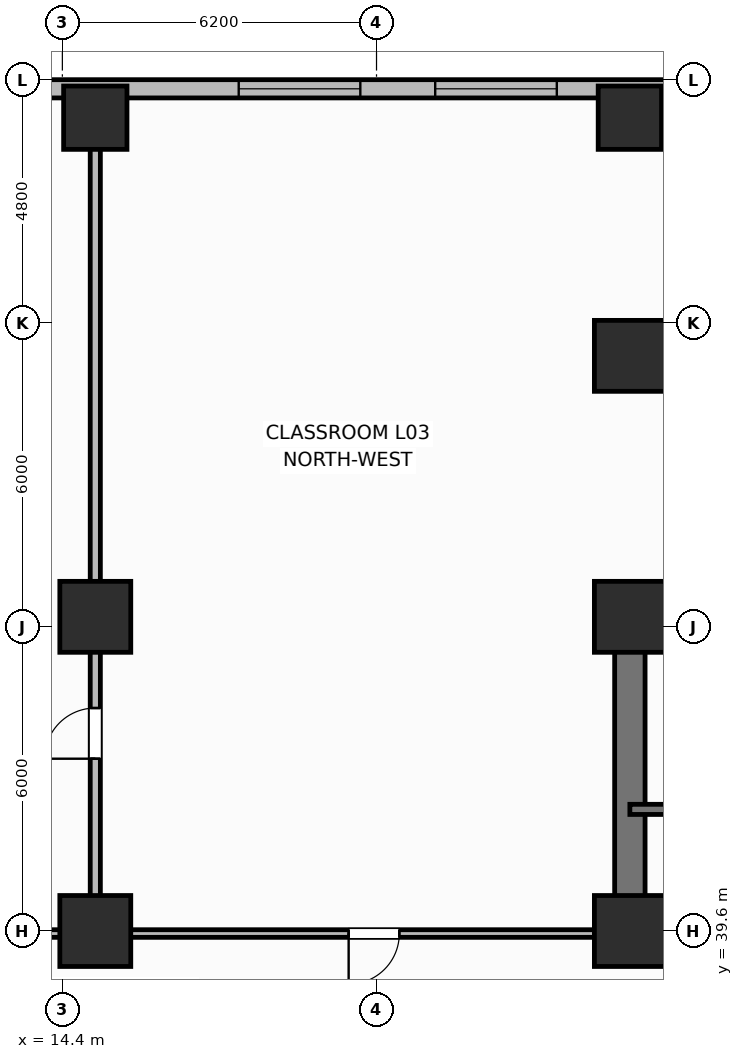
"""IFC4 building model, lengths in metres.
Left out: names, types, materials, properties, quantities, classifications, styles, units other than length and angle.
Written with IfcOpenShell. Run it as: python <this file> out.ifc"""

import sys

from ifc_helpers import new_model, si_unit, direction, frame, frame_2d, origin, origin_2d, place, context, subcontext, project, spatial, rectangle, extrude, element, fill, save


model = new_model("IFC4")
c1 = context("Model", 3, precision=1e-05, world=origin(), true_north=direction((0.0, 1.0)))
c2 = subcontext(c1, "Body", "Model", "MODEL_VIEW")
j1 = project(units=[si_unit("LENGTHUNIT", "METRE"), si_unit("PLANEANGLEUNIT", "RADIAN")], contexts=[c1])
p1 = place(None, origin())
s1 = spatial("IfcSite", under=j1, at=p1, CompositionType="ELEMENT")
p2 = place(p1, origin())
s2 = spatial("IfcBuilding", under=s1, at=p2, CompositionType="ELEMENT")
p3 = place(p2, frame((0.0, 0.0, 15.6)))
s3 = spatial("IfcBuildingStorey", under=s2, at=p3, CompositionType="ELEMENT", Elevation=15.6)
p4 = place(p3, frame((25.6, 45.8, 0.0), z_axis=(0.0, 0.0, 1.0), x_axis=(1.0, 0.0, 0.0)))
e1 = element("IfcWall", 1, at=p4, inside=s3, PredefinedType="SHEAR", context=c2, shape_type="SweptSolid", body=[
    extrude(rectangle(XDim=27.2, YDim=0.6, at=frame_2d((13.6, 0.0))), origin(), (0.0, 0.0, 1.0), 4.5),
])
p5 = place(p3, frame((25.6, 39.9, 0.0), z_axis=(0.0, 0.0, 1.0), x_axis=(0.0, 1.0, 0.0)))
e2 = element("IfcWall", 2, at=p5, inside=s3, PredefinedType="SHEAR", context=c2, shape_type="SweptSolid", body=[
    extrude(rectangle(XDim=5.6, YDim=0.6, at=frame_2d((2.8, 0.0))), origin(), (0.0, 0.0, 1.0), 4.5),
])
p6 = place(p3, frame((52.8, 39.6, 0.0), z_axis=(0.0, 0.0, 1.0), x_axis=(-1.0, 0.0, 0.0)))
e3 = element("IfcWall", 3, at=p6, inside=s3, PredefinedType="SHEAR", context=c2, shape_type="SweptSolid", body=[
    extrude(rectangle(XDim=27.2, YDim=0.6, at=frame_2d((13.6, 0.0))), origin(), (0.0, 0.0, 1.0), 4.5),
])
p7 = place(p6, frame((24.3, 0.0, 0.0)))
e4 = element("IfcOpeningElement", 4, at=p7, cuts=e3, PredefinedType="OPENING", context=c2, shape_type="SweptSolid", body=[
    extrude(rectangle(XDim=1.1, YDim=2.15, at=frame_2d((0.55, 1.075))), frame((0.0, 0.31, 0.0), z_axis=(0.0, -1.0, 0.0), x_axis=(1.0, 0.0, 0.0)), (0.0, 0.0, 1.0), 0.62),
])
p8 = place(p6, frame((21.85, 0.0, 0.0)))
e5 = element("IfcOpeningElement", 5, at=p8, cuts=e3, PredefinedType="OPENING", context=c2, shape_type="SweptSolid", body=[
    extrude(rectangle(XDim=0.85, YDim=2.1, at=frame_2d((0.425, 1.05))), frame((0.0, 0.31, 0.0), z_axis=(0.0, -1.0, 0.0), x_axis=(1.0, 0.0, 0.0)), (0.0, 0.0, 1.0), 0.62),
])
p9 = place(p6, frame((19.85, 0.0, 0.0)))
e6 = element("IfcOpeningElement", 6, at=p9, cuts=e3, PredefinedType="OPENING", context=c2, shape_type="SweptSolid", body=[
    extrude(rectangle(XDim=0.85, YDim=2.1, at=frame_2d((0.425, 1.05))), frame((0.0, 0.31, 0.0), z_axis=(0.0, -1.0, 0.0), x_axis=(1.0, 0.0, 0.0)), (0.0, 0.0, 1.0), 0.62),
])
p10 = place(p6, frame((15.1, 0.0, 0.0)))
e7 = element("IfcOpeningElement", 7, at=p10, cuts=e3, PredefinedType="OPENING", context=c2, shape_type="SweptSolid", body=[
    extrude(rectangle(XDim=1.2, YDim=2.15, at=frame_2d((0.6, 1.075))), frame((0.0, 0.31, 0.0), z_axis=(0.0, -1.0, 0.0), x_axis=(1.0, 0.0, 0.0)), (0.0, 0.0, 1.0), 0.62),
])
p11 = place(p6, frame((12.6, 0.0, 0.0)))
e8 = element("IfcOpeningElement", 8, at=p11, cuts=e3, PredefinedType="OPENING", context=c2, shape_type="SweptSolid", body=[
    extrude(rectangle(XDim=0.85, YDim=2.1, at=frame_2d((0.425, 1.05))), frame((0.0, 0.31, 0.0), z_axis=(0.0, -1.0, 0.0), x_axis=(1.0, 0.0, 0.0)), (0.0, 0.0, 1.0), 0.62),
])
p12 = place(p6, frame((10.85, 0.0, 0.0)))
e9 = element("IfcOpeningElement", 9, at=p12, cuts=e3, PredefinedType="OPENING", context=c2, shape_type="SweptSolid", body=[
    extrude(rectangle(XDim=0.85, YDim=2.1, at=frame_2d((0.425, 1.05))), frame((0.0, 0.31, 0.0), z_axis=(0.0, -1.0, 0.0), x_axis=(1.0, 0.0, 0.0)), (0.0, 0.0, 1.0), 0.62),
])
p13 = place(p6, frame((6.85, 0.0, 0.0)))
e10 = element("IfcOpeningElement", 10, at=p13, cuts=e3, PredefinedType="OPENING", context=c2, shape_type="SweptSolid", body=[
    extrude(rectangle(XDim=0.85, YDim=2.1, at=frame_2d((0.425, 1.05))), frame((0.0, 0.31, 0.0), z_axis=(0.0, -1.0, 0.0), x_axis=(1.0, 0.0, 0.0)), (0.0, 0.0, 1.0), 0.62),
])
p14 = place(p6, frame((2.0, 0.0, 0.0)))
e11 = element("IfcOpeningElement", 11, at=p14, cuts=e3, PredefinedType="OPENING", context=c2, shape_type="SweptSolid", body=[
    extrude(rectangle(XDim=0.85, YDim=2.1, at=frame_2d((0.425, 1.05))), frame((0.0, 0.31, 0.0), z_axis=(0.0, -1.0, 0.0), x_axis=(1.0, 0.0, 0.0)), (0.0, 0.0, 1.0), 0.62),
])
for number, where, z_axis, x_axis in (
    (12, (25.6, 39.6, 0.0), (0.0, 0.0, 1.0), (1.0, 0.0, 0.0)),
    (13, (25.6, 45.8, 0.0), (0.0, 0.0, 1.0), (1.0, 0.0, 0.0)),
):
    element("IfcColumn", number, at=place(p3, frame(where, z_axis=z_axis, x_axis=x_axis)), inside=s3, PredefinedType="COLUMN", context=c2, shape_type="SweptSolid", body=[
        extrude(rectangle(XDim=1.4, YDim=1.4, at=origin_2d()), origin(), (0.0, 0.0, 1.0), 4.5),
    ])
for number, where, z_axis, x_axis in (
    (14, (15.05, 55.65, 0.0), (0.0, 0.0, 1.0), (1.0, 0.0, 0.0)),
    (15, (25.6, 55.65, 0.0), (0.0, 0.0, 1.0), (1.0, 0.0, 0.0)),
):
    element("IfcColumn", number, at=place(p3, frame(where, z_axis=z_axis, x_axis=x_axis)), inside=s3, PredefinedType="COLUMN", context=c2, shape_type="SweptSolid", body=[
        extrude(rectangle(XDim=1.25, YDim=1.25, at=origin_2d()), origin(), (0.0, 0.0, 1.0), 4.5),
    ])
for number, where, z_axis, x_axis in (
    (16, (25.6, 50.95, 0.0), (0.0, 0.0, 1.0), (1.0, 0.0, 0.0)),
    (17, (15.05, 39.6, 0.0), (0.0, 0.0, 1.0), (1.0, 0.0, 0.0)),
    (18, (15.05, 45.8, 0.0), (0.0, 0.0, 1.0), (1.0, 0.0, 0.0)),
):
    element("IfcColumn", number, at=place(p3, frame(where, z_axis=z_axis, x_axis=x_axis)), inside=s3, PredefinedType="COLUMN", context=c2, shape_type="SweptSolid", body=[
        extrude(rectangle(XDim=1.4, YDim=1.4, at=origin_2d()), origin(), (0.0, 0.0, 1.0), 4.5),
    ])
p15 = place(p3, frame((56.57, 56.22, 0.0), z_axis=(0.0, 0.0, 1.0), x_axis=(-1.0, 0.0, 0.0)))
e19 = element("IfcWall", 19, at=p15, inside=s3, PredefinedType="SOLIDWALL", context=c2, shape_type="SweptSolid", body=[
    extrude(rectangle(XDim=55.59, YDim=0.36, at=frame_2d((27.795, 0.0))), origin(), (0.0, 0.0, 1.0), 3.48),
])
p16 = place(p15, frame((5.267, 0.0, 0.85)))
e20 = element("IfcOpeningElement", 20, at=p16, cuts=e19, PredefinedType="OPENING", context=c2, shape_type="SweptSolid", body=[
    extrude(rectangle(XDim=2.4, YDim=2.25, at=frame_2d((1.2, 1.125))), frame((0.0, 0.19, 0.0), z_axis=(0.0, -1.0, 0.0), x_axis=(1.0, 0.0, 0.0)), (0.0, 0.0, 1.0), 0.38),
])
p17 = place(p15, frame((9.145, 0.0, 0.85)))
e21 = element("IfcOpeningElement", 21, at=p17, cuts=e19, PredefinedType="OPENING", context=c2, shape_type="SweptSolid", body=[
    extrude(rectangle(XDim=2.4, YDim=2.25, at=frame_2d((1.2, 1.125))), frame((0.0, 0.19, 0.0), z_axis=(0.0, -1.0, 0.0), x_axis=(1.0, 0.0, 0.0)), (0.0, 0.0, 1.0), 0.38),
])
p18 = place(p15, frame((13.022, 0.0, 0.85)))
e22 = element("IfcOpeningElement", 22, at=p18, cuts=e19, PredefinedType="OPENING", context=c2, shape_type="SweptSolid", body=[
    extrude(rectangle(XDim=2.4, YDim=2.25, at=frame_2d((1.2, 1.125))), frame((0.0, 0.19, 0.0), z_axis=(0.0, -1.0, 0.0), x_axis=(1.0, 0.0, 0.0)), (0.0, 0.0, 1.0), 0.38),
])
p19 = place(p15, frame((20.778, 0.0, 0.85)))
e23 = element("IfcOpeningElement", 23, at=p19, cuts=e19, PredefinedType="OPENING", context=c2, shape_type="SweptSolid", body=[
    extrude(rectangle(XDim=2.4, YDim=2.25, at=frame_2d((1.2, 1.125))), frame((0.0, 0.19, 0.0), z_axis=(0.0, -1.0, 0.0), x_axis=(1.0, 0.0, 0.0)), (0.0, 0.0, 1.0), 0.38),
])
p20 = place(p15, frame((24.656, 0.0, 0.85)))
e24 = element("IfcOpeningElement", 24, at=p20, cuts=e19, PredefinedType="OPENING", context=c2, shape_type="SweptSolid", body=[
    extrude(rectangle(XDim=2.4, YDim=2.25, at=frame_2d((1.2, 1.125))), frame((0.0, 0.19, 0.0), z_axis=(0.0, -1.0, 0.0), x_axis=(1.0, 0.0, 0.0)), (0.0, 0.0, 1.0), 0.38),
])
p21 = place(p15, frame((32.412, 0.0, 0.85)))
e25 = element("IfcOpeningElement", 25, at=p21, cuts=e19, PredefinedType="OPENING", context=c2, shape_type="SweptSolid", body=[
    extrude(rectangle(XDim=2.4, YDim=2.25, at=frame_2d((1.2, 1.125))), frame((0.0, 0.19, 0.0), z_axis=(0.0, -1.0, 0.0), x_axis=(1.0, 0.0, 0.0)), (0.0, 0.0, 1.0), 0.38),
])
p22 = place(p15, frame((36.29, 0.0, 0.85)))
e26 = element("IfcOpeningElement", 26, at=p22, cuts=e19, PredefinedType="OPENING", context=c2, shape_type="SweptSolid", body=[
    extrude(rectangle(XDim=2.4, YDim=2.25, at=frame_2d((1.2, 1.125))), frame((0.0, 0.19, 0.0), z_axis=(0.0, -1.0, 0.0), x_axis=(1.0, 0.0, 0.0)), (0.0, 0.0, 1.0), 0.38),
])
p23 = place(p15, frame((44.045, 0.0, 0.85)))
e27 = element("IfcOpeningElement", 27, at=p23, cuts=e19, PredefinedType="OPENING", context=c2, shape_type="SweptSolid", body=[
    extrude(rectangle(XDim=2.4, YDim=2.25, at=frame_2d((1.2, 1.125))), frame((0.0, 0.19, 0.0), z_axis=(0.0, -1.0, 0.0), x_axis=(1.0, 0.0, 0.0)), (0.0, 0.0, 1.0), 0.38),
])
p24 = place(p15, frame((51.801, 0.0, 0.85)))
e28 = element("IfcOpeningElement", 28, at=p24, cuts=e19, PredefinedType="OPENING", context=c2, shape_type="SweptSolid", body=[
    extrude(rectangle(XDim=2.4, YDim=2.25, at=frame_2d((1.2, 1.125))), frame((0.0, 0.19, 0.0), z_axis=(0.0, -1.0, 0.0), x_axis=(1.0, 0.0, 0.0)), (0.0, 0.0, 1.0), 0.38),
])
p25 = place(p3, frame((35.15, 42.0, 0.0), z_axis=(0.0, 0.0, 1.0), x_axis=(-1.0, 0.0, 0.0)))
e29 = element("IfcWall", 29, at=p25, inside=s3, PredefinedType="SHEAR", context=c2, shape_type="SweptSolid", body=[
    extrude(rectangle(XDim=9.55, YDim=0.2, at=frame_2d((4.775, 0.0))), origin(), (0.0, 0.0, 1.0), 4.5),
])
p26 = place(p25, frame((7.25, 0.0, 0.0)))
e30 = element("IfcOpeningElement", 30, at=p26, cuts=e29, PredefinedType="OPENING", context=c2, shape_type="SweptSolid", body=[
    extrude(rectangle(XDim=1.1, YDim=2.15, at=frame_2d((0.55, 1.075))), frame((0.0, 0.11, 0.0), z_axis=(0.0, -1.0, 0.0), x_axis=(1.0, 0.0, 0.0)), (0.0, 0.0, 1.0), 0.22),
])
p27 = place(p3, frame((15.05, 39.6, 0.0), z_axis=(0.0, 0.0, 1.0), x_axis=(0.0, 1.0, 0.0)))
e31 = element("IfcWall", 31, at=p27, inside=s3, PredefinedType="PARTITIONING", context=c2, shape_type="SweptSolid", body=[
    extrude(rectangle(XDim=16.4, YDim=0.2, at=frame_2d((8.2, 0.0))), origin(), (0.0, 0.0, 1.0), 3.42),
])
p28 = place(p27, frame((3.4, 0.0, 0.0)))
e32 = element("IfcOpeningElement", 32, at=p28, cuts=e31, PredefinedType="OPENING", context=c2, shape_type="SweptSolid", body=[
    extrude(rectangle(XDim=1.0, YDim=2.15, at=frame_2d((0.5, 1.075))), frame((0.0, 0.11, 0.0), z_axis=(0.0, -1.0, 0.0), x_axis=(1.0, 0.0, 0.0)), (0.0, 0.0, 1.0), 0.22),
])
p29 = place(p3, frame((25.25, 39.55, 0.0), z_axis=(0.0, 0.0, 1.0), x_axis=(-1.0, 0.0, 0.0)))
e33 = element("IfcWall", 33, at=p29, inside=s3, PredefinedType="PARTITIONING", context=c2, shape_type="SweptSolid", body=[
    extrude(rectangle(XDim=13.25, YDim=0.15, at=frame_2d((6.625, 0.0))), origin(), (0.0, 0.0, 1.0), 3.42),
])
p30 = place(p29, frame((4.2, 0.0, 0.0)))
e34 = element("IfcOpeningElement", 34, at=p30, cuts=e33, PredefinedType="OPENING", context=c2, shape_type="SweptSolid", body=[
    extrude(rectangle(XDim=1.0, YDim=2.15, at=frame_2d((0.5, 1.075))), frame((0.0, 0.085, 0.0), z_axis=(0.0, -1.0, 0.0), x_axis=(1.0, 0.0, 0.0)), (0.0, 0.0, 1.0), 0.17),
])
p31 = place(p21, origin())
e35 = element("IfcWindow", 35, at=p31, inside=s3, PartitioningType="SINGLE_PANEL", PredefinedType="WINDOW", context=c2, shape_type="SweptSolid", body=[
    extrude(rectangle(XDim=2.4, YDim=2.25, at=frame_2d((1.2, 1.125))), frame((0.0, 0.03, 0.0), z_axis=(0.0, -1.0, 0.0), x_axis=(1.0, 0.0, 0.0)), (0.0, 0.0, 1.0), 0.06),
])
fill(e25, e35)
p32 = place(p22, origin())
e36 = element("IfcWindow", 36, at=p32, inside=s3, PartitioningType="SINGLE_PANEL", PredefinedType="WINDOW", context=c2, shape_type="SweptSolid", body=[
    extrude(rectangle(XDim=2.4, YDim=2.25, at=frame_2d((1.2, 1.125))), frame((0.0, 0.03, 0.0), z_axis=(0.0, -1.0, 0.0), x_axis=(1.0, 0.0, 0.0)), (0.0, 0.0, 1.0), 0.06),
])
fill(e26, e36)
p33 = place(p28, origin())
e37 = element("IfcDoor", 37, at=p33, inside=s3, OperationType="SINGLE_SWING_LEFT", PredefinedType="DOOR", context=c2, shape_type="SweptSolid", body=[
    extrude(rectangle(XDim=1.0, YDim=2.15, at=frame_2d((0.5, 1.075))), frame((0.0, 0.025, 0.0), z_axis=(0.0, -1.0, 0.0), x_axis=(1.0, 0.0, 0.0)), (0.0, 0.0, 1.0), 0.05),
])
fill(e32, e37)
p34 = place(p30, origin())
e38 = element("IfcDoor", 38, at=p34, inside=s3, OperationType="SINGLE_SWING_RIGHT", PredefinedType="DOOR", context=c2, shape_type="SweptSolid", body=[
    extrude(rectangle(XDim=1.0, YDim=2.15, at=frame_2d((0.5, 1.075))), frame((0.0, 0.025, 0.0), z_axis=(0.0, -1.0, 0.0), x_axis=(1.0, 0.0, 0.0)), (0.0, 0.0, 1.0), 0.05),
])
fill(e34, e38)
save(model, sys.argv[1])
